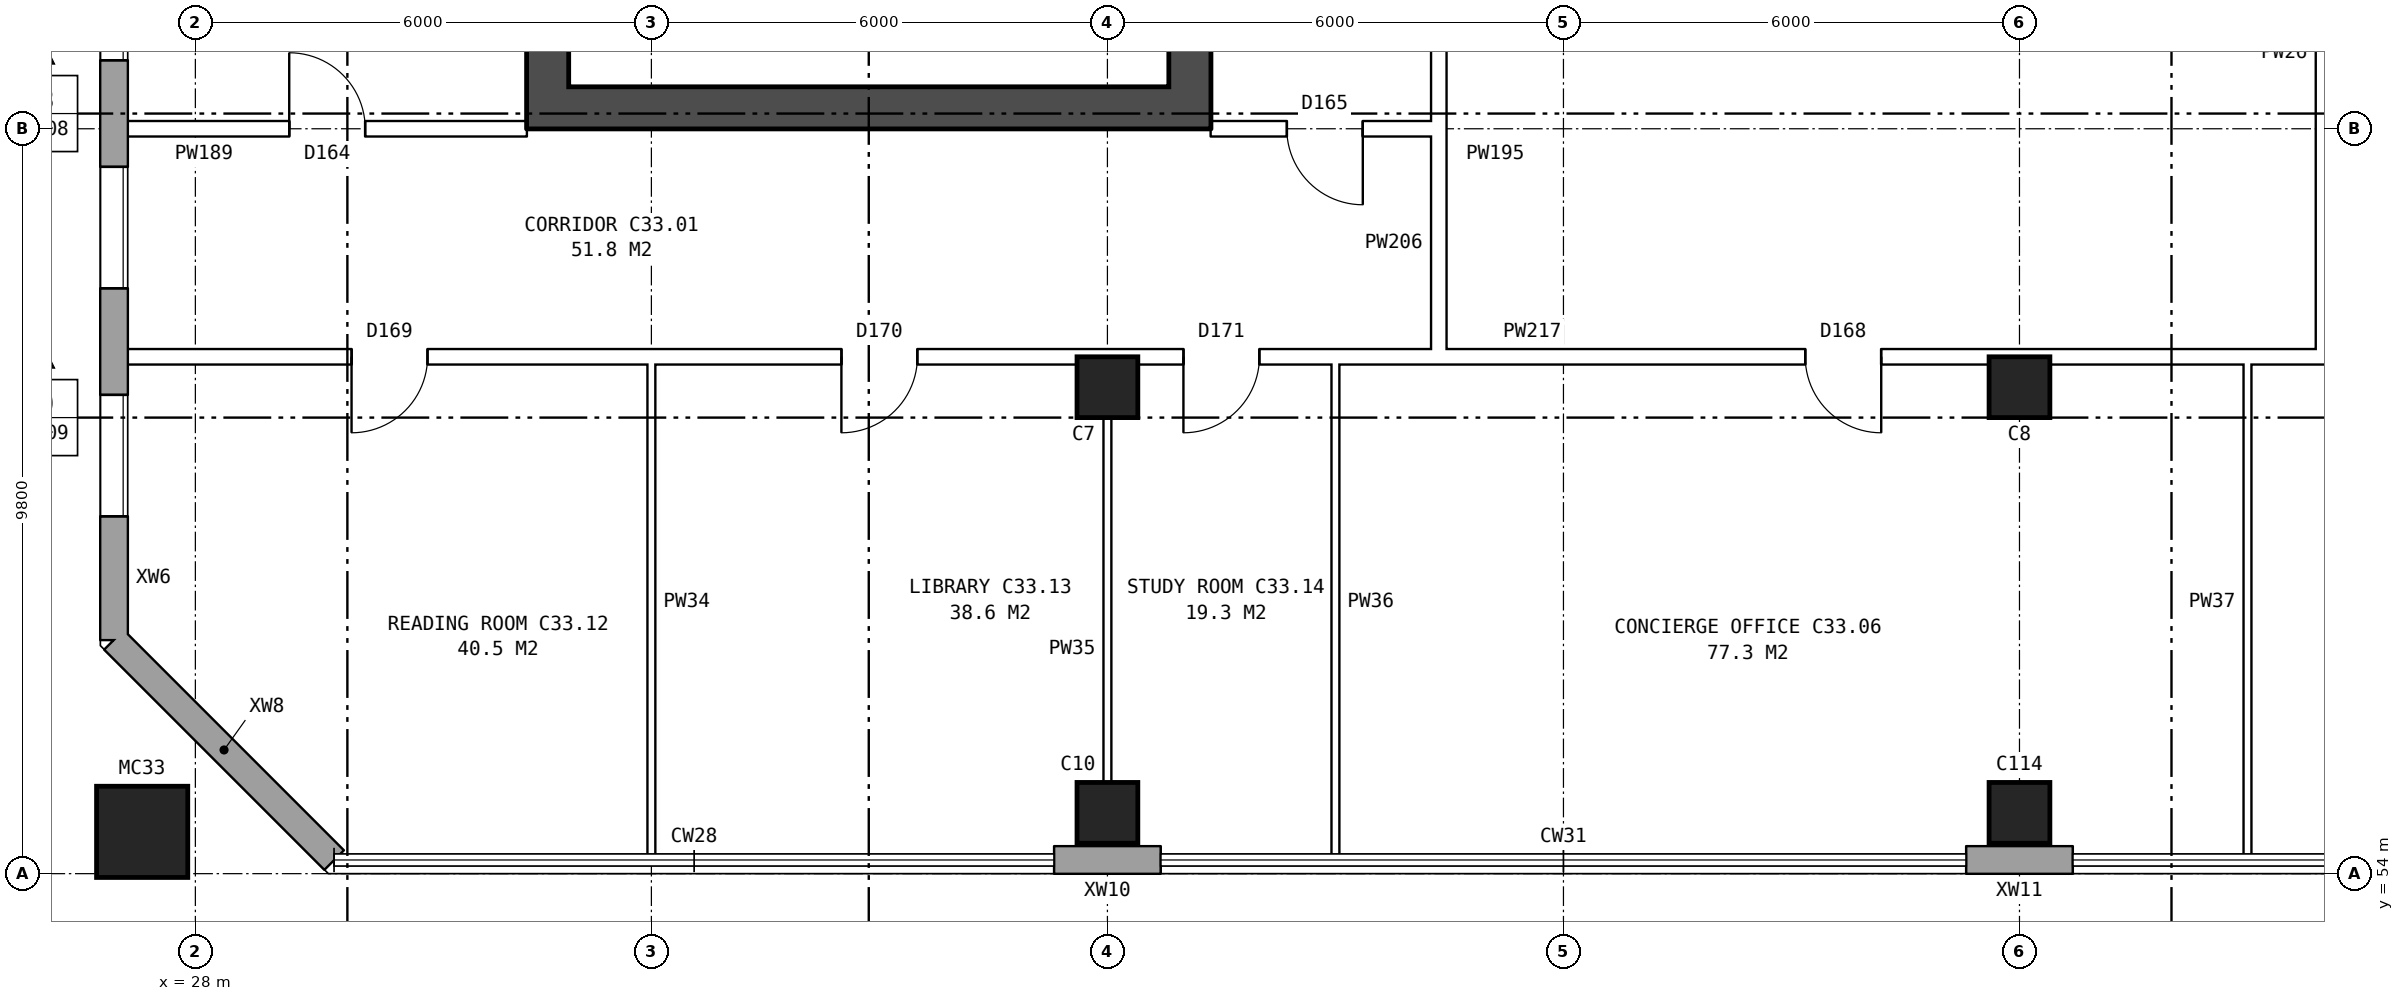
"""IFC4 building model, lengths in metres.
Left out: names, types, materials, properties, quantities, classifications, styles, units other than length and angle.
Written with IfcOpenShell. Run it as: python <this file> out.ifc"""

import sys

from ifc_helpers import new_model, si_unit, direction, frame, frame_2d, origin, origin_2d, place, context, subcontext, project, spatial, rectangle, hollow_rectangle, extrude, element, fill, save


model = new_model("IFC4")
c1 = context("Model", 3, precision=1e-05, world=origin(), true_north=direction((0.0, 1.0)))
c2 = subcontext(c1, "Body", "Model", "MODEL_VIEW")
j1 = project(units=[si_unit("LENGTHUNIT", "METRE"), si_unit("PLANEANGLEUNIT", "RADIAN")], contexts=[c1])
p1 = place(None, origin())
s1 = spatial("IfcSite", under=j1, at=p1, CompositionType="ELEMENT")
p2 = place(p1, origin())
s2 = spatial("IfcBuilding", under=s1, at=p2, CompositionType="ELEMENT")
p3 = place(p2, frame((0.0, 0.0, 119.5)))
s3 = spatial("IfcBuildingStorey", under=s2, at=p3, CompositionType="ELEMENT", Elevation=119.5)
for number, where, z_axis, x_axis in (
    (1, (40.0, 54.8, 0.0), (0.0, 0.0, 1.0), (1.0, 0.0, 0.0)),
    (2, (40.0, 60.4, 0.0), (0.0, 0.0, 1.0), (1.0, 0.0, 0.0)),
    (3, (52.0, 54.8, 0.0), (0.0, 0.0, 1.0), (1.0, 0.0, 0.0)),
    (4, (52.0, 60.4, 0.0), (0.0, 0.0, 1.0), (1.0, 0.0, 0.0)),
):
    element("IfcColumn", number, at=place(p3, frame(where, z_axis=z_axis, x_axis=x_axis)), inside=s3, PredefinedType="COLUMN", context=c2, shape_type="SweptSolid", body=[
        extrude(rectangle(XDim=0.8, YDim=0.8, at=origin_2d()), origin(), (0.0, 0.0, 1.0), 3.6),
    ])
p4 = place(p3, frame((27.3, 54.55, 0.0), z_axis=(0.0, 0.0, 1.0), x_axis=(1.0, 0.0, 0.0)))
e5 = element("IfcColumn", 5, at=p4, inside=s3, PredefinedType="COLUMN", context=c2, shape_type="SweptSolid", body=[
    extrude(hollow_rectangle(XDim=1.2, YDim=1.2, WallThickness=0.065, at=origin_2d()), origin(), (0.0, 0.0, 1.0), 4.2),
])
p5 = place(p3, frame((26.93, 57.075, 0.0), z_axis=(0.0, 0.0, 1.0), x_axis=(0.707106781187, -0.707106781187, 0.0)))
e6 = element("IfcWall", 6, at=p5, inside=s3, PredefinedType="STANDARD", context=c2, shape_type="SweptSolid", body=[
    extrude(rectangle(XDim=4.094, YDim=0.36, at=frame_2d((2.047, 0.0))), origin(), (0.0, 0.0, 1.0), 3.6),
])
for number, where, z_axis, x_axis in (
    (7, (39.3, 54.18, 0.0), (0.0, 0.0, 1.0), (1.0, 0.0, 0.0)),
    (8, (51.3, 54.18, 0.0), (0.0, 0.0, 1.0), (1.0, 0.0, 0.0)),
):
    element("IfcWall", number, at=place(p3, frame(where, z_axis=z_axis, x_axis=x_axis)), inside=s3, PredefinedType="STANDARD", context=c2, shape_type="SweptSolid", body=[
        extrude(rectangle(XDim=1.4, YDim=0.36, at=frame_2d((0.7, 0.0))), origin(), (0.0, 0.0, 1.0), 3.6),
    ])
p6 = place(p3, frame((26.93, 82.925, 0.0), z_axis=(0.0, 0.0, 1.0), x_axis=(0.0, -1.0, 0.0)))
e9 = element("IfcWall", 9, at=p6, inside=s3, PredefinedType="STANDARD", context=c2, shape_type="SweptSolid", body=[
    extrude(rectangle(XDim=25.851, YDim=0.36, at=frame_2d((12.925, 0.0))), origin(), (0.0, 0.0, 1.0), 3.6),
])
p7 = place(p6, frame((1.625, 0.0, 0.8)))
e10 = element("IfcOpeningElement", 10, at=p7, cuts=e9, PredefinedType="OPENING", context=c2, shape_type="SweptSolid", body=[
    extrude(rectangle(XDim=1.6, YDim=1.8, at=frame_2d((0.8, 0.9))), frame((0.0, 0.19, 0.0), z_axis=(0.0, -1.0, 0.0), x_axis=(1.0, 0.0, 0.0)), (0.0, 0.0, 1.0), 0.38),
])
p8 = place(p6, frame((4.625, 0.0, 0.8)))
e11 = element("IfcOpeningElement", 11, at=p8, cuts=e9, PredefinedType="OPENING", context=c2, shape_type="SweptSolid", body=[
    extrude(rectangle(XDim=1.6, YDim=1.8, at=frame_2d((0.8, 0.9))), frame((0.0, 0.19, 0.0), z_axis=(0.0, -1.0, 0.0), x_axis=(1.0, 0.0, 0.0)), (0.0, 0.0, 1.0), 0.38),
])
p9 = place(p6, frame((7.625, 0.0, 0.8)))
e12 = element("IfcOpeningElement", 12, at=p9, cuts=e9, PredefinedType="OPENING", context=c2, shape_type="SweptSolid", body=[
    extrude(rectangle(XDim=1.6, YDim=1.8, at=frame_2d((0.8, 0.9))), frame((0.0, 0.19, 0.0), z_axis=(0.0, -1.0, 0.0), x_axis=(1.0, 0.0, 0.0)), (0.0, 0.0, 1.0), 0.38),
])
p10 = place(p6, frame((10.625, 0.0, 0.8)))
e13 = element("IfcOpeningElement", 13, at=p10, cuts=e9, PredefinedType="OPENING", context=c2, shape_type="SweptSolid", body=[
    extrude(rectangle(XDim=1.6, YDim=1.8, at=frame_2d((0.8, 0.9))), frame((0.0, 0.19, 0.0), z_axis=(0.0, -1.0, 0.0), x_axis=(1.0, 0.0, 0.0)), (0.0, 0.0, 1.0), 0.38),
])
p11 = place(p6, frame((13.625, 0.0, 0.8)))
e14 = element("IfcOpeningElement", 14, at=p11, cuts=e9, PredefinedType="OPENING", context=c2, shape_type="SweptSolid", body=[
    extrude(rectangle(XDim=1.6, YDim=1.8, at=frame_2d((0.8, 0.9))), frame((0.0, 0.19, 0.0), z_axis=(0.0, -1.0, 0.0), x_axis=(1.0, 0.0, 0.0)), (0.0, 0.0, 1.0), 0.38),
])
p12 = place(p6, frame((16.625, 0.0, 0.8)))
e15 = element("IfcOpeningElement", 15, at=p12, cuts=e9, PredefinedType="OPENING", context=c2, shape_type="SweptSolid", body=[
    extrude(rectangle(XDim=1.6, YDim=1.8, at=frame_2d((0.8, 0.9))), frame((0.0, 0.19, 0.0), z_axis=(0.0, -1.0, 0.0), x_axis=(1.0, 0.0, 0.0)), (0.0, 0.0, 1.0), 0.38),
])
p13 = place(p6, frame((19.625, 0.0, 0.8)))
e16 = element("IfcOpeningElement", 16, at=p13, cuts=e9, PredefinedType="OPENING", context=c2, shape_type="SweptSolid", body=[
    extrude(rectangle(XDim=1.6, YDim=1.8, at=frame_2d((0.8, 0.9))), frame((0.0, 0.19, 0.0), z_axis=(0.0, -1.0, 0.0), x_axis=(1.0, 0.0, 0.0)), (0.0, 0.0, 1.0), 0.38),
])
p14 = place(p6, frame((22.625, 0.0, 0.8)))
e17 = element("IfcOpeningElement", 17, at=p14, cuts=e9, PredefinedType="OPENING", context=c2, shape_type="SweptSolid", body=[
    extrude(rectangle(XDim=1.6, YDim=1.8, at=frame_2d((0.8, 0.9))), frame((0.0, 0.19, 0.0), z_axis=(0.0, -1.0, 0.0), x_axis=(1.0, 0.0, 0.0)), (0.0, 0.0, 1.0), 0.38),
])
p15 = place(p3, frame((41.085, 76.2, 0.0), z_axis=(0.0, 0.0, 1.0), x_axis=(0.0, -1.0, 0.0)))
e18 = element("IfcWall", 18, at=p15, inside=s3, PredefinedType="SHEAR", context=c2, shape_type="SweptSolid", body=[
    extrude(rectangle(XDim=12.4, YDim=0.55, at=frame_2d((6.2, 0.0))), origin(), (0.0, 0.0, 1.0), 3.6),
])
p16 = place(p15, frame((1.325, 0.0, 0.0)))
e19 = element("IfcOpeningElement", 19, at=p16, cuts=e18, PredefinedType="OPENING", context=c2, shape_type="SweptSolid", body=[
    extrude(rectangle(XDim=1.1, YDim=2.1, at=frame_2d((0.55, 1.05))), frame((0.0, 0.285, 0.0), z_axis=(0.0, -1.0, 0.0), x_axis=(1.0, 0.0, 0.0)), (0.0, 0.0, 1.0), 0.57),
])
p17 = place(p15, frame((3.6, 0.0, 0.0)))
e20 = element("IfcOpeningElement", 20, at=p17, cuts=e18, PredefinedType="OPENING", context=c2, shape_type="SweptSolid", body=[
    extrude(rectangle(XDim=1.1, YDim=2.1, at=frame_2d((0.55, 1.05))), frame((0.0, 0.285, 0.0), z_axis=(0.0, -1.0, 0.0), x_axis=(1.0, 0.0, 0.0)), (0.0, 0.0, 1.0), 0.57),
])
p18 = place(p15, frame((5.8, 0.0, 0.0)))
e21 = element("IfcOpeningElement", 21, at=p18, cuts=e18, PredefinedType="OPENING", context=c2, shape_type="SweptSolid", body=[
    extrude(rectangle(XDim=1.1, YDim=2.1, at=frame_2d((0.55, 1.05))), frame((0.0, 0.285, 0.0), z_axis=(0.0, -1.0, 0.0), x_axis=(1.0, 0.0, 0.0)), (0.0, 0.0, 1.0), 0.57),
])
p19 = place(p15, frame((8.0, 0.0, 0.0)))
e22 = element("IfcOpeningElement", 22, at=p19, cuts=e18, PredefinedType="OPENING", context=c2, shape_type="SweptSolid", body=[
    extrude(rectangle(XDim=1.1, YDim=2.1, at=frame_2d((0.55, 1.05))), frame((0.0, 0.285, 0.0), z_axis=(0.0, -1.0, 0.0), x_axis=(1.0, 0.0, 0.0)), (0.0, 0.0, 1.0), 0.57),
])
p20 = place(p15, frame((9.9, 0.0, 0.0)))
e23 = element("IfcOpeningElement", 23, at=p20, cuts=e18, PredefinedType="OPENING", context=c2, shape_type="SweptSolid", body=[
    extrude(rectangle(XDim=1.1, YDim=2.1, at=frame_2d((0.55, 1.05))), frame((0.0, 0.285, 0.0), z_axis=(0.0, -1.0, 0.0), x_axis=(1.0, 0.0, 0.0)), (0.0, 0.0, 1.0), 0.57),
])
p21 = place(p3, frame((32.635, 76.2, 0.0), z_axis=(0.0, 0.0, 1.0), x_axis=(0.0, -1.0, 0.0)))
e24 = element("IfcWall", 24, at=p21, inside=s3, PredefinedType="SHEAR", context=c2, shape_type="SweptSolid", body=[
    extrude(rectangle(XDim=12.4, YDim=0.55, at=frame_2d((6.2, 0.0))), origin(), (0.0, 0.0, 1.0), 3.6),
])
p22 = place(p3, frame((40.81, 64.075, 0.0), z_axis=(0.0, 0.0, 1.0), x_axis=(-1.0, 0.0, 0.0)))
e25 = element("IfcWall", 25, at=p22, inside=s3, PredefinedType="SHEAR", context=c2, shape_type="SweptSolid", body=[
    extrude(rectangle(XDim=7.9, YDim=0.55, at=frame_2d((3.95, 0.0))), origin(), (0.0, 0.0, 1.0), 3.6),
])
p23 = place(p3, frame((44.36, 63.9, 0.0), z_axis=(0.0, 0.0, 1.0), x_axis=(0.0, 1.0, 0.0)))
e26 = element("IfcWall", 26, at=p23, inside=s3, PredefinedType="PARTITIONING", context=c2, shape_type="SweptSolid", body=[
    extrude(rectangle(XDim=12.2, YDim=0.2, at=frame_2d((6.1, 0.0))), origin(), (0.0, 0.0, 1.0), 3.6),
])
p24 = place(p23, frame((5.1, 0.0, 0.0)))
e27 = element("IfcOpeningElement", 27, at=p24, cuts=e26, PredefinedType="OPENING", context=c2, shape_type="SweptSolid", body=[
    extrude(rectangle(XDim=2.0, YDim=2.1, at=frame_2d((1.0, 1.05))), frame((0.0, 0.11, 0.0), z_axis=(0.0, -1.0, 0.0), x_axis=(1.0, 0.0, 0.0)), (0.0, 0.0, 1.0), 0.22),
])
p25 = place(p3, frame((26.99, 60.8, 0.0), z_axis=(0.0, 0.0, 1.0), x_axis=(1.0, 0.0, 0.0)))
e28 = element("IfcWall", 28, at=p25, inside=s3, PredefinedType="PARTITIONING", context=c2, shape_type="SweptSolid", body=[
    extrude(rectangle(XDim=29.11, YDim=0.2, at=frame_2d((14.555, 0.0))), origin(), (0.0, 0.0, 1.0), 3.6),
])
p26 = place(p25, frame((3.065, 0.0, 0.0)))
e29 = element("IfcOpeningElement", 29, at=p26, cuts=e28, PredefinedType="OPENING", context=c2, shape_type="SweptSolid", body=[
    extrude(rectangle(XDim=1.0, YDim=2.1, at=frame_2d((0.5, 1.05))), frame((0.0, 0.11, 0.0), z_axis=(0.0, -1.0, 0.0), x_axis=(1.0, 0.0, 0.0)), (0.0, 0.0, 1.0), 0.22),
])
p27 = place(p25, frame((9.51, 0.0, 0.0)))
e30 = element("IfcOpeningElement", 30, at=p27, cuts=e28, PredefinedType="OPENING", context=c2, shape_type="SweptSolid", body=[
    extrude(rectangle(XDim=1.0, YDim=2.1, at=frame_2d((0.5, 1.05))), frame((0.0, 0.11, 0.0), z_axis=(0.0, -1.0, 0.0), x_axis=(1.0, 0.0, 0.0)), (0.0, 0.0, 1.0), 0.22),
])
p28 = place(p25, frame((14.01, 0.0, 0.0)))
e31 = element("IfcOpeningElement", 31, at=p28, cuts=e28, PredefinedType="OPENING", context=c2, shape_type="SweptSolid", body=[
    extrude(rectangle(XDim=1.0, YDim=2.1, at=frame_2d((0.5, 1.05))), frame((0.0, 0.11, 0.0), z_axis=(0.0, -1.0, 0.0), x_axis=(1.0, 0.0, 0.0)), (0.0, 0.0, 1.0), 0.22),
])
p29 = place(p25, frame((22.191, 0.0, 0.0)))
e32 = element("IfcOpeningElement", 32, at=p29, cuts=e28, PredefinedType="OPENING", context=c2, shape_type="SweptSolid", body=[
    extrude(rectangle(XDim=1.0, YDim=2.1, at=frame_2d((0.5, 1.05))), frame((0.0, 0.11, 0.0), z_axis=(0.0, -1.0, 0.0), x_axis=(1.0, 0.0, 0.0)), (0.0, 0.0, 1.0), 0.22),
])
p30 = place(p3, frame((26.99, 63.8, 0.0), z_axis=(0.0, 0.0, 1.0), x_axis=(1.0, 0.0, 0.0)))
e33 = element("IfcWall", 33, at=p30, inside=s3, PredefinedType="PARTITIONING", context=c2, shape_type="SweptSolid", body=[
    extrude(rectangle(XDim=5.37, YDim=0.2, at=frame_2d((2.685, 0.0))), origin(), (0.0, 0.0, 1.0), 3.6),
])
p31 = place(p30, frame((2.245, 0.0, 0.0)))
e34 = element("IfcOpeningElement", 34, at=p31, cuts=e33, PredefinedType="OPENING", context=c2, shape_type="SweptSolid", body=[
    extrude(rectangle(XDim=1.0, YDim=2.1, at=frame_2d((0.5, 1.05))), frame((0.0, 0.11, 0.0), z_axis=(0.0, -1.0, 0.0), x_axis=(1.0, 0.0, 0.0)), (0.0, 0.0, 1.0), 0.22),
])
p32 = place(p3, frame((41.36, 63.8, 0.0), z_axis=(0.0, 0.0, 1.0), x_axis=(1.0, 0.0, 0.0)))
e35 = element("IfcWall", 35, at=p32, inside=s3, PredefinedType="PARTITIONING", context=c2, shape_type="SweptSolid", body=[
    extrude(rectangle(XDim=3.1, YDim=0.2, at=frame_2d((1.55, 0.0))), origin(), (0.0, 0.0, 1.0), 3.6),
])
p33 = place(p32, frame((1.0, 0.0, 0.0)))
e36 = element("IfcOpeningElement", 36, at=p33, cuts=e35, PredefinedType="OPENING", context=c2, shape_type="SweptSolid", body=[
    extrude(rectangle(XDim=1.0, YDim=2.1, at=frame_2d((0.5, 1.05))), frame((0.0, 0.11, 0.0), z_axis=(0.0, -1.0, 0.0), x_axis=(1.0, 0.0, 0.0)), (0.0, 0.0, 1.0), 0.22),
])
for number, where, z_axis, x_axis in (
    (37, (34.0, 54.24, 0.0), (0.0, 0.0, 1.0), (0.0, 1.0, 0.0)),
    (38, (40.0, 54.24, 0.0), (0.0, 0.0, 1.0), (0.0, 1.0, 0.0)),
    (39, (43.0, 54.24, 0.0), (0.0, 0.0, 1.0), (0.0, 1.0, 0.0)),
):
    element("IfcWall", number, at=place(p3, frame(where, z_axis=z_axis, x_axis=x_axis)), inside=s3, PredefinedType="PARTITIONING", context=c2, shape_type="SweptSolid", body=[
        extrude(rectangle(XDim=6.66, YDim=0.1, at=frame_2d((3.33, 0.0))), origin(), (0.0, 0.0, 1.0), 3.6),
    ])
p34 = place(p3, frame((44.36, 60.7, 0.0), z_axis=(0.0, 0.0, 1.0), x_axis=(0.0, 1.0, 0.0)))
e40 = element("IfcWall", 40, at=p34, inside=s3, PredefinedType="PARTITIONING", context=c2, shape_type="SweptSolid", body=[
    extrude(rectangle(XDim=3.2, YDim=0.2, at=frame_2d((1.6, 0.0))), origin(), (0.0, 0.0, 1.0), 3.6),
])
p35 = place(p3, frame((55.0, 54.24, 0.0), z_axis=(0.0, 0.0, 1.0), x_axis=(0.0, 1.0, 0.0)))
e41 = element("IfcWall", 41, at=p35, inside=s3, PredefinedType="PARTITIONING", context=c2, shape_type="SweptSolid", body=[
    extrude(rectangle(XDim=6.66, YDim=0.1, at=frame_2d((3.33, 0.0))), origin(), (0.0, 0.0, 1.0), 3.6),
])
p36 = place(p3, frame((56.0, 60.7, 0.0), z_axis=(0.0, 0.0, 1.0), x_axis=(0.0, 1.0, 0.0)))
e42 = element("IfcWall", 42, at=p36, inside=s3, PredefinedType="PARTITIONING", context=c2, shape_type="SweptSolid", body=[
    extrude(rectangle(XDim=8.2, YDim=0.2, at=frame_2d((4.1, 0.0))), origin(), (0.0, 0.0, 1.0), 3.6),
])
p37 = place(p12, origin())
e43 = element("IfcWindow", 43, at=p37, inside=s3, PartitioningType="SINGLE_PANEL", PredefinedType="WINDOW", context=c2, shape_type="SweptSolid", body=[
    extrude(rectangle(XDim=1.6, YDim=1.8, at=frame_2d((0.8, 0.9))), frame((0.0, 0.15, 0.0), z_axis=(0.0, -1.0, 0.0), x_axis=(1.0, 0.0, 0.0)), (0.0, 0.0, 1.0), 0.06),
])
fill(e15, e43)
p38 = place(p13, origin())
e44 = element("IfcWindow", 44, at=p38, inside=s3, PartitioningType="SINGLE_PANEL", PredefinedType="WINDOW", context=c2, shape_type="SweptSolid", body=[
    extrude(rectangle(XDim=1.6, YDim=1.8, at=frame_2d((0.8, 0.9))), frame((0.0, 0.15, 0.0), z_axis=(0.0, -1.0, 0.0), x_axis=(1.0, 0.0, 0.0)), (0.0, 0.0, 1.0), 0.06),
])
fill(e16, e44)
p39 = place(p14, origin())
e45 = element("IfcWindow", 45, at=p39, inside=s3, PartitioningType="SINGLE_PANEL", PredefinedType="WINDOW", context=c2, shape_type="SweptSolid", body=[
    extrude(rectangle(XDim=1.6, YDim=1.8, at=frame_2d((0.8, 0.9))), frame((0.0, 0.15, 0.0), z_axis=(0.0, -1.0, 0.0), x_axis=(1.0, 0.0, 0.0)), (0.0, 0.0, 1.0), 0.06),
])
fill(e17, e45)
p40 = place(p26, frame((1.0, 0.0, 0.0), z_axis=(0.0, 0.0, 1.0), x_axis=(-1.0, 0.0, 0.0)))
e46 = element("IfcDoor", 46, at=p40, inside=s3, OperationType="SINGLE_SWING_RIGHT", PredefinedType="DOOR", context=c2, shape_type="SweptSolid", body=[
    extrude(rectangle(XDim=1.0, YDim=2.1, at=frame_2d((0.5, 1.05))), frame((0.0, 0.025, 0.0), z_axis=(0.0, -1.0, 0.0), x_axis=(1.0, 0.0, 0.0)), (0.0, 0.0, 1.0), 0.05),
])
fill(e29, e46)
p41 = place(p27, frame((1.0, 0.0, 0.0), z_axis=(0.0, 0.0, 1.0), x_axis=(-1.0, 0.0, 0.0)))
e47 = element("IfcDoor", 47, at=p41, inside=s3, OperationType="SINGLE_SWING_RIGHT", PredefinedType="DOOR", context=c2, shape_type="SweptSolid", body=[
    extrude(rectangle(XDim=1.0, YDim=2.1, at=frame_2d((0.5, 1.05))), frame((0.0, 0.025, 0.0), z_axis=(0.0, -1.0, 0.0), x_axis=(1.0, 0.0, 0.0)), (0.0, 0.0, 1.0), 0.05),
])
fill(e30, e47)
p42 = place(p28, frame((1.0, 0.0, 0.0), z_axis=(0.0, 0.0, 1.0), x_axis=(-1.0, 0.0, 0.0)))
e48 = element("IfcDoor", 48, at=p42, inside=s3, OperationType="SINGLE_SWING_RIGHT", PredefinedType="DOOR", context=c2, shape_type="SweptSolid", body=[
    extrude(rectangle(XDim=1.0, YDim=2.1, at=frame_2d((0.5, 1.05))), frame((0.0, 0.025, 0.0), z_axis=(0.0, -1.0, 0.0), x_axis=(1.0, 0.0, 0.0)), (0.0, 0.0, 1.0), 0.05),
])
fill(e31, e48)
p43 = place(p29, frame((1.0, 0.0, 0.0), z_axis=(0.0, 0.0, 1.0), x_axis=(-1.0, 0.0, 0.0)))
e49 = element("IfcDoor", 49, at=p43, inside=s3, OperationType="SINGLE_SWING_LEFT", PredefinedType="DOOR", context=c2, shape_type="SweptSolid", body=[
    extrude(rectangle(XDim=1.0, YDim=2.1, at=frame_2d((0.5, 1.05))), frame((0.0, 0.025, 0.0), z_axis=(0.0, -1.0, 0.0), x_axis=(1.0, 0.0, 0.0)), (0.0, 0.0, 1.0), 0.05),
])
fill(e32, e49)
p44 = place(p31, origin())
e50 = element("IfcDoor", 50, at=p44, inside=s3, OperationType="SINGLE_SWING_LEFT", PredefinedType="DOOR", context=c2, shape_type="SweptSolid", body=[
    extrude(rectangle(XDim=1.0, YDim=2.1, at=frame_2d((0.5, 1.05))), frame((0.0, 0.025, 0.0), z_axis=(0.0, -1.0, 0.0), x_axis=(1.0, 0.0, 0.0)), (0.0, 0.0, 1.0), 0.05),
])
fill(e34, e50)
p45 = place(p33, frame((1.0, 0.0, 0.0), z_axis=(0.0, 0.0, 1.0), x_axis=(-1.0, 0.0, 0.0)))
e51 = element("IfcDoor", 51, at=p45, inside=s3, OperationType="SINGLE_SWING_LEFT", PredefinedType="DOOR", context=c2, shape_type="SweptSolid", body=[
    extrude(rectangle(XDim=1.0, YDim=2.1, at=frame_2d((0.5, 1.05))), frame((0.0, 0.025, 0.0), z_axis=(0.0, -1.0, 0.0), x_axis=(1.0, 0.0, 0.0)), (0.0, 0.0, 1.0), 0.05),
])
fill(e36, e51)
save(model, sys.argv[1])
